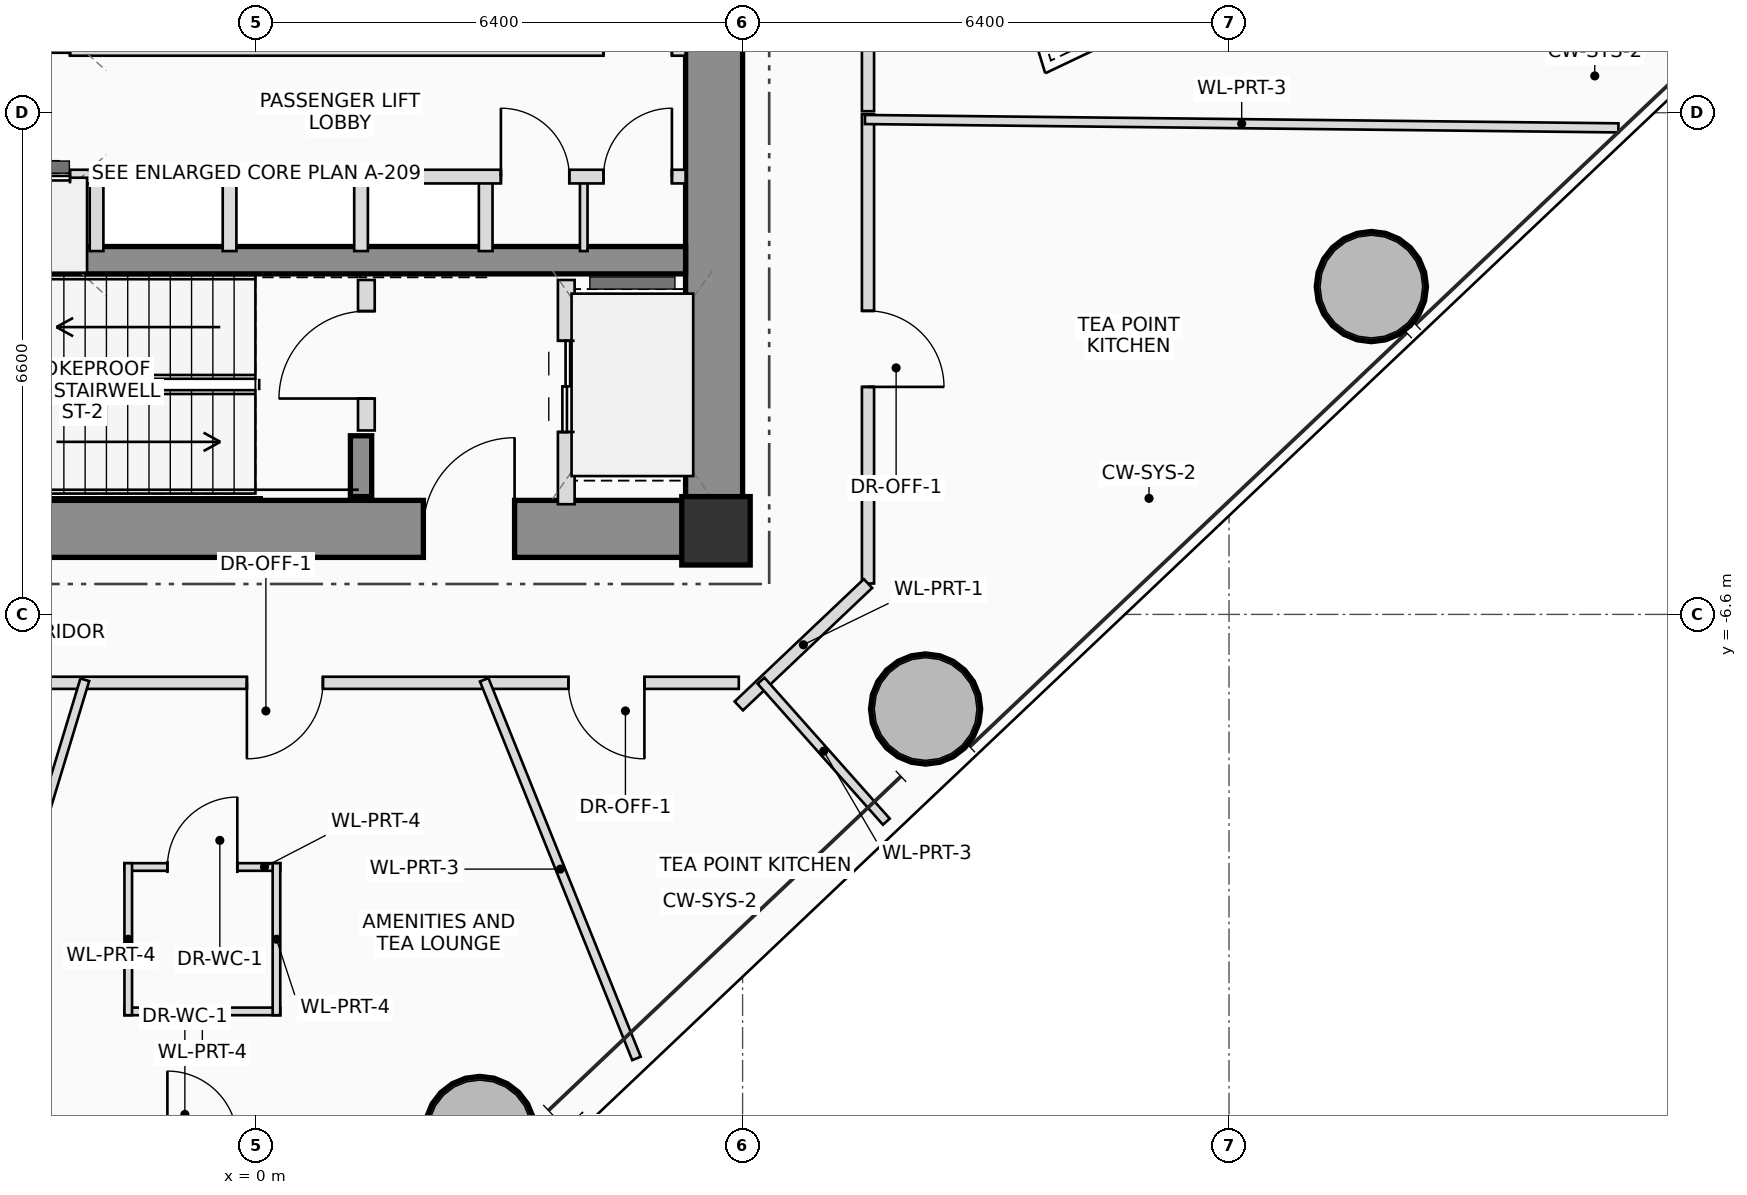
"""IFC4 building model, lengths in metres.
Left out: names, types, materials, properties, quantities, classifications, styles, units other than length and angle.
Written with IfcOpenShell. Run it as: python <this file> out.ifc"""

import sys

from ifc_helpers import new_model, si_unit, direction, frame, frame_2d, origin, origin_2d, place, context, subcontext, project, spatial, rectangle, hollow_circle, extrude, source, transform, mapped, element, fill, save


model = new_model("IFC4")
c1 = context("Model", 3, precision=1e-05, world=origin(), true_north=direction((0.0, 1.0)))
c2 = subcontext(c1, "Body", "Model", "MODEL_VIEW")
j1 = project(units=[si_unit("LENGTHUNIT", "METRE"), si_unit("PLANEANGLEUNIT", "RADIAN")], contexts=[c1])
p1 = place(None, origin())
s1 = spatial("IfcSite", under=j1, at=p1, CompositionType="ELEMENT")
p2 = place(p1, origin())
s2 = spatial("IfcBuilding", under=s1, at=p2, CompositionType="ELEMENT")
p3 = place(p2, frame((0.0, 0.0, 97.4)))
s3 = spatial("IfcBuildingStorey", under=s2, at=p3, CompositionType="ELEMENT", Elevation=97.4)
m1 = source(origin(), c2, "Body", "SweptSolid", [
    extrude(rectangle(XDim=0.9, YDim=0.9, at=origin_2d()), origin(), (0.0, 0.0, 1.0), 3.75),
])
p4 = place(p3, frame((6.05, -5.5, 0.0), z_axis=(0.0, 0.0, 1.0), x_axis=(1.0, 0.0, 0.0)))
e1 = element("IfcColumn", 1, at=p4, inside=s3, PredefinedType="COLUMN", context=c2, shape_type="MappedRepresentation", body=[
    mapped(m1, transform((0.0, 0.0, 0.0), scale=1.0)),
])
p5 = place(p3, frame((-6.4, -5.475, 0.0), z_axis=(0.0, 0.0, 1.0), x_axis=(1.0, 0.0, 0.0)))
e2 = element("IfcWall", 2, at=p5, inside=s3, PredefinedType="SHEAR", context=c2, shape_type="SweptSolid", body=[
    extrude(rectangle(XDim=12.8, YDim=0.75, at=frame_2d((6.4, 0.0))), origin(), (0.0, 0.0, 1.0), 3.75),
])
p6 = place(p5, frame((8.6, 0.0, 0.0)))
e3 = element("IfcOpeningElement", 3, at=p6, cuts=e2, PredefinedType="OPENING", context=c2, shape_type="SweptSolid", body=[
    extrude(rectangle(XDim=1.2, YDim=2.2, at=frame_2d((0.6, 1.1))), frame((0.0, 0.385, 0.0), z_axis=(0.0, -1.0, 0.0), x_axis=(1.0, 0.0, 0.0)), (0.0, 0.0, 1.0), 0.77),
])
p7 = place(p3, frame((6.025, -5.1, 0.0), z_axis=(0.0, 0.0, 1.0), x_axis=(0.0, 1.0, 0.0)))
e4 = element("IfcWall", 4, at=p7, inside=s3, PredefinedType="SHEAR", context=c2, shape_type="SweptSolid", body=[
    extrude(rectangle(XDim=10.2, YDim=0.75, at=frame_2d((5.1, 0.0))), origin(), (0.0, 0.0, 1.0), 3.75),
])
p8 = place(p3, frame((-5.65, -1.94, 0.0), z_axis=(0.0, 0.0, 1.0), x_axis=(1.0, 0.0, 0.0)))
e5 = element("IfcWall", 5, at=p8, inside=s3, PredefinedType="SHEAR", context=c2, shape_type="SweptSolid", body=[
    extrude(rectangle(XDim=11.3, YDim=0.36, at=frame_2d((5.65, 0.0))), origin(), (0.0, 0.0, 1.0), 3.75),
])
p9 = place(p3, frame((1.38, -5.05, 0.0), z_axis=(0.0, 0.0, 1.0), x_axis=(0.0, 1.0, 0.0)))
e6 = element("IfcWall", 6, at=p9, inside=s3, PredefinedType="SHEAR", context=c2, shape_type="SweptSolid", body=[
    extrude(rectangle(XDim=0.8, YDim=0.28, at=frame_2d((0.4, 0.0))), origin(), (0.0, 0.0, 1.0), 3.75),
])
m2 = source(origin(), c2, "Body", "SweptSolid", [
    extrude(hollow_circle(Radius=0.725, WallThickness=0.05, at=origin_2d()), origin(), (0.0, 0.0, 1.0), 3.75),
])
for number, where, z_axis, x_axis in (
    (7, (2.943, -13.402, 0.0), (0.0, 0.0, 1.0), (1.0, 0.0, 0.0)),
    (8, (8.808, -7.845, 0.0), (0.0, 0.0, 1.0), (1.0, 0.0, 0.0)),
    (9, (14.673, -2.287, 0.0), (0.0, 0.0, 1.0), (1.0, 0.0, 0.0)),
):
    element("IfcColumn", number, at=place(p3, frame(where, z_axis=z_axis, x_axis=x_axis)), inside=s3, PredefinedType="COLUMN", context=c2, shape_type="MappedRepresentation", body=[
        mapped(m2, transform((0.0, 0.0, 0.0), scale=1.0)),
    ])
p10 = place(p3, frame((1.45, -4.18, 0.0), z_axis=(0.0, 0.0, 1.0), x_axis=(0.0, 1.0, 0.0)))
e10 = element("IfcWall", 10, at=p10, inside=s3, PredefinedType="PLUMBINGWALL", context=c2, shape_type="SweptSolid", body=[
    extrude(rectangle(XDim=1.98, YDim=0.22, at=frame_2d((0.99, 0.0))), origin(), (0.0, 0.0, 1.0), 3.545),
])
p11 = place(p10, frame((0.42, 0.0, 0.0)))
e11 = element("IfcOpeningElement", 11, at=p11, cuts=e10, PredefinedType="OPENING", context=c2, shape_type="SweptSolid", body=[
    extrude(rectangle(XDim=1.15, YDim=2.15, at=frame_2d((0.575, 1.075))), frame((0.0, 0.12, 0.0), z_axis=(0.0, -1.0, 0.0), x_axis=(1.0, 0.0, 0.0)), (0.0, 0.0, 1.0), 0.24),
])
p12 = place(p3, frame((4.08, -5.15, 0.0), z_axis=(0.0, 0.0, 1.0), x_axis=(0.0, 1.0, 0.0)))
e12 = element("IfcWall", 12, at=p12, inside=s3, PredefinedType="PLUMBINGWALL", context=c2, shape_type="SweptSolid", body=[
    extrude(rectangle(XDim=2.95, YDim=0.22, at=frame_2d((1.475, 0.0))), origin(), (0.0, 0.0, 1.0), 3.545),
])
p13 = place(p12, frame((0.95, 0.0, 0.0)))
e13 = element("IfcOpeningElement", 13, at=p13, cuts=e12, PredefinedType="OPENING", context=c2, shape_type="SweptSolid", body=[
    extrude(rectangle(XDim=1.2, YDim=2.25, at=frame_2d((0.6, 1.125))), frame((0.0, 0.12, 0.0), z_axis=(0.0, -1.0, 0.0), x_axis=(1.0, 0.0, 0.0)), (0.0, 0.0, 1.0), 0.24),
])
for number, where, z_axis, x_axis in (
    (14, (-2.1, -1.82, 0.0), (0.0, 0.0, 1.0), (0.0, 1.0, 0.0)),
    (15, (-0.35, -1.82, 0.0), (0.0, 0.0, 1.0), (0.0, 1.0, 0.0)),
    (16, (1.38, -1.82, 0.0), (0.0, 0.0, 1.0), (0.0, 1.0, 0.0)),
    (17, (3.02, -1.82, 0.0), (0.0, 0.0, 1.0), (0.0, 1.0, 0.0)),
):
    element("IfcWall", number, at=place(p3, frame(where, z_axis=z_axis, x_axis=x_axis)), inside=s3, PredefinedType="PLUMBINGWALL", context=c2, shape_type="SweptSolid", body=[
        extrude(rectangle(XDim=0.98, YDim=0.18, at=frame_2d((0.49, 0.0))), origin(), (0.0, 0.0, 1.0), 3.545),
    ])
p14 = place(p3, frame((4.31, -1.82, 0.0), z_axis=(0.0, 0.0, 1.0), x_axis=(0.0, 1.0, 0.0)))
e18 = element("IfcWall", 18, at=p14, inside=s3, PredefinedType="PARTITIONING", context=c2, shape_type="SweptSolid", body=[
    extrude(rectangle(XDim=0.98, YDim=0.1, at=frame_2d((0.49, 0.0))), origin(), (0.0, 0.0, 1.0), 3.545),
])
p15 = place(p3, frame((-5.68, 0.84, 0.0), z_axis=(0.0, 0.0, 1.0), x_axis=(1.0, 0.0, 0.0)))
e19 = element("IfcWall", 19, at=p15, inside=s3, PredefinedType="PLUMBINGWALL", context=c2, shape_type="SweptSolid", body=[
    extrude(rectangle(XDim=11.33, YDim=0.18, at=frame_2d((5.665, 0.0))), origin(), (0.0, 0.0, 1.0), 3.545),
])
p16 = place(p15, frame((0.43, 0.0, 0.0)))
e20 = element("IfcOpeningElement", 20, at=p16, cuts=e19, PredefinedType="OPENING", context=c2, shape_type="SweptSolid", body=[
    extrude(rectangle(XDim=1.1, YDim=2.2, at=frame_2d((0.55, 1.1))), frame((0.0, 0.1, 0.0), z_axis=(0.0, -1.0, 0.0), x_axis=(1.0, 0.0, 0.0)), (0.0, 0.0, 1.0), 0.2),
])
p17 = place(p15, frame((2.13, 0.0, 0.0)))
e21 = element("IfcOpeningElement", 21, at=p17, cuts=e19, PredefinedType="OPENING", context=c2, shape_type="SweptSolid", body=[
    extrude(rectangle(XDim=1.1, YDim=2.2, at=frame_2d((0.55, 1.1))), frame((0.0, 0.1, 0.0), z_axis=(0.0, -1.0, 0.0), x_axis=(1.0, 0.0, 0.0)), (0.0, 0.0, 1.0), 0.2),
])
p18 = place(p15, frame((10.25, 0.0, 0.0)))
e22 = element("IfcOpeningElement", 22, at=p18, cuts=e19, PredefinedType="OPENING", context=c2, shape_type="SweptSolid", body=[
    extrude(rectangle(XDim=0.9, YDim=2.05, at=frame_2d((0.45, 1.025))), frame((0.0, 0.1, 0.0), z_axis=(0.0, -1.0, 0.0), x_axis=(1.0, 0.0, 0.0)), (0.0, 0.0, 1.0), 0.2),
])
p19 = place(p3, frame((-5.68, -0.84, 0.0), z_axis=(0.0, 0.0, 1.0), x_axis=(1.0, 0.0, 0.0)))
e23 = element("IfcWall", 23, at=p19, inside=s3, PredefinedType="PLUMBINGWALL", context=c2, shape_type="SweptSolid", body=[
    extrude(rectangle(XDim=11.33, YDim=0.18, at=frame_2d((5.665, 0.0))), origin(), (0.0, 0.0, 1.0), 3.545),
])
p20 = place(p19, frame((0.43, 0.0, 0.0)))
e24 = element("IfcOpeningElement", 24, at=p20, cuts=e23, PredefinedType="OPENING", context=c2, shape_type="SweptSolid", body=[
    extrude(rectangle(XDim=1.1, YDim=2.2, at=frame_2d((0.55, 1.1))), frame((0.0, 0.1, 0.0), z_axis=(0.0, -1.0, 0.0), x_axis=(1.0, 0.0, 0.0)), (0.0, 0.0, 1.0), 0.2),
])
p21 = place(p19, frame((2.13, 0.0, 0.0)))
e25 = element("IfcOpeningElement", 25, at=p21, cuts=e23, PredefinedType="OPENING", context=c2, shape_type="SweptSolid", body=[
    extrude(rectangle(XDim=1.1, YDim=2.2, at=frame_2d((0.55, 1.1))), frame((0.0, 0.1, 0.0), z_axis=(0.0, -1.0, 0.0), x_axis=(1.0, 0.0, 0.0)), (0.0, 0.0, 1.0), 0.2),
])
p22 = place(p19, frame((8.9, 0.0, 0.0)))
e26 = element("IfcOpeningElement", 26, at=p22, cuts=e23, PredefinedType="OPENING", context=c2, shape_type="SweptSolid", body=[
    extrude(rectangle(XDim=0.9, YDim=2.05, at=frame_2d((0.45, 1.025))), frame((0.0, 0.1, 0.0), z_axis=(0.0, -1.0, 0.0), x_axis=(1.0, 0.0, 0.0)), (0.0, 0.0, 1.0), 0.2),
])
p23 = place(p19, frame((10.25, 0.0, 0.0)))
e27 = element("IfcOpeningElement", 27, at=p23, cuts=e23, PredefinedType="OPENING", context=c2, shape_type="SweptSolid", body=[
    extrude(rectangle(XDim=0.9, YDim=2.05, at=frame_2d((0.45, 1.025))), frame((0.0, 0.1, 0.0), z_axis=(0.0, -1.0, 0.0), x_axis=(1.0, 0.0, 0.0)), (0.0, 0.0, 1.0), 0.2),
])
p24 = place(p3, frame((-1.733, -9.923, 0.0), z_axis=(0.0, 0.0, 1.0), x_axis=(1.0, 0.0, 0.0)))
e28 = element("IfcWall", 28, at=p24, inside=s3, PredefinedType="PARTITIONING", context=c2, shape_type="SweptSolid", body=[
    extrude(rectangle(XDim=2.05, YDim=0.1, at=frame_2d((1.025, 0.0))), origin(), (0.0, 0.0, 1.0), 3.545),
])
p25 = place(p24, frame((0.565, 0.0, 0.0)))
e29 = element("IfcOpeningElement", 29, at=p25, cuts=e28, PredefinedType="OPENING", context=c2, shape_type="SweptSolid", body=[
    extrude(rectangle(XDim=0.92, YDim=2.1, at=frame_2d((0.46, 1.05))), frame((0.0, 0.06, 0.0), z_axis=(0.0, -1.0, 0.0), x_axis=(1.0, 0.0, 0.0)), (0.0, 0.0, 1.0), 0.12),
])
p26 = place(p3, frame((0.317, -11.823, 0.0), z_axis=(0.0, 0.0, 1.0), x_axis=(-1.0, 0.0, 0.0)))
e30 = element("IfcWall", 30, at=p26, inside=s3, PredefinedType="PARTITIONING", context=c2, shape_type="SweptSolid", body=[
    extrude(rectangle(XDim=2.05, YDim=0.1, at=frame_2d((1.025, 0.0))), origin(), (0.0, 0.0, 1.0), 3.05),
])
for number, where, z_axis, x_axis in (
    (31, (0.267, -9.873, 0.0), (0.0, 0.0, 1.0), (0.0, -1.0, 0.0)),
    (32, (-1.683, -11.873, 0.0), (0.0, 0.0, 1.0), (0.0, 1.0, 0.0)),
):
    element("IfcWall", number, at=place(p3, frame(where, z_axis=z_axis, x_axis=x_axis)), inside=s3, PredefinedType="PARTITIONING", context=c2, shape_type="SweptSolid", body=[
        extrude(rectangle(XDim=2.0, YDim=0.1, at=frame_2d((1.0, 0.0))), origin(), (0.0, 0.0, 1.0), 3.05),
    ])
p27 = place(p3, frame((8.05, 7.5, 0.0), z_axis=(0.0, 0.0, 1.0), x_axis=(0.0, -1.0, 0.0)))
e33 = element("IfcWall", 33, at=p27, inside=s3, PredefinedType="PARTITIONING", context=c2, shape_type="SweptSolid", body=[
    extrude(rectangle(XDim=7.48, YDim=0.16, at=frame_2d((3.74, 0.0))), origin(), (0.0, 0.0, 1.0), 2.85),
])
p28 = place(p27, frame((5.491, 0.0, 0.0)))
e34 = element("IfcOpeningElement", 34, at=p28, cuts=e33, PredefinedType="OPENING", context=c2, shape_type="SweptSolid", body=[
    extrude(rectangle(XDim=1.0, YDim=2.25, at=frame_2d((0.5, 1.125))), frame((0.0, 0.09, 0.0), z_axis=(0.0, -1.0, 0.0), x_axis=(1.0, 0.0, 0.0)), (0.0, 0.0, 1.0), 0.18),
])
p29 = place(p3, frame((8.05, -0.02, 0.0), z_axis=(0.0, 0.0, 1.0), x_axis=(0.0, -1.0, 0.0)))
e35 = element("IfcWall", 35, at=p29, inside=s3, PredefinedType="PARTITIONING", context=c2, shape_type="SweptSolid", body=[
    extrude(rectangle(XDim=6.174, YDim=0.16, at=frame_2d((3.087, 0.0))), origin(), (0.0, 0.0, 1.0), 2.85),
])
p30 = place(p29, frame((2.587, 0.0, 0.0)))
e36 = element("IfcOpeningElement", 36, at=p30, cuts=e35, PredefinedType="OPENING", context=c2, shape_type="SweptSolid", body=[
    extrude(rectangle(XDim=1.0, YDim=2.25, at=frame_2d((0.5, 1.125))), frame((0.0, 0.09, 0.0), z_axis=(0.0, -1.0, 0.0), x_axis=(1.0, 0.0, 0.0)), (0.0, 0.0, 1.0), 0.18),
])
p31 = place(p3, frame((8.05, -6.194, 0.0), z_axis=(0.0, 0.0, 1.0), x_axis=(-0.725875977514, -0.687825606726, 0.0)))
e37 = element("IfcWall", 37, at=p31, inside=s3, PredefinedType="PARTITIONING", context=c2, shape_type="SweptSolid", body=[
    extrude(rectangle(XDim=2.342, YDim=0.16, at=frame_2d((1.171, 0.0))), origin(), (0.0, 0.0, 1.0), 2.85),
])
p32 = place(p3, frame((6.35, -7.5, 0.0), z_axis=(0.0, 0.0, 1.0), x_axis=(-1.0, 0.0, 0.0)))
e38 = element("IfcWall", 38, at=p32, inside=s3, PredefinedType="PARTITIONING", context=c2, shape_type="SweptSolid", body=[
    extrude(rectangle(XDim=12.7, YDim=0.16, at=frame_2d((6.35, 0.0))), origin(), (0.0, 0.0, 1.0), 2.85),
])
p33 = place(p32, frame((1.242, 0.0, 0.0)))
e39 = element("IfcOpeningElement", 39, at=p33, cuts=e38, PredefinedType="OPENING", context=c2, shape_type="SweptSolid", body=[
    extrude(rectangle(XDim=1.0, YDim=2.25, at=frame_2d((0.5, 1.125))), frame((0.0, 0.09, 0.0), z_axis=(0.0, -1.0, 0.0), x_axis=(1.0, 0.0, 0.0)), (0.0, 0.0, 1.0), 0.18),
])
p34 = place(p32, frame((5.472, 0.0, 0.0)))
e40 = element("IfcOpeningElement", 40, at=p34, cuts=e38, PredefinedType="OPENING", context=c2, shape_type="SweptSolid", body=[
    extrude(rectangle(XDim=1.0, YDim=2.25, at=frame_2d((0.5, 1.125))), frame((0.0, 0.09, 0.0), z_axis=(0.0, -1.0, 0.0), x_axis=(1.0, 0.0, 0.0)), (0.0, 0.0, 1.0), 0.18),
])
p35 = place(p3, frame((-2.255, -7.46, 0.0), z_axis=(0.0, 0.0, 1.0), x_axis=(-0.289332531311, -0.957228648926, 0.0)))
e41 = element("IfcWall", 41, at=p35, inside=s3, PredefinedType="PARTITIONING", context=c2, shape_type="SweptSolid", body=[
    extrude(rectangle(XDim=14.611, YDim=0.12, at=frame_2d((7.305, 0.0))), origin(), (0.0, 0.0, 1.0), 2.85),
])
p36 = place(p3, frame((3.0, -7.46, 0.0), z_axis=(0.0, 0.0, 1.0), x_axis=(0.37313810105, -0.927775812115, 0.0)))
e42 = element("IfcWall", 42, at=p36, inside=s3, PredefinedType="PARTITIONING", context=c2, shape_type="SweptSolid", body=[
    extrude(rectangle(XDim=5.37, YDim=0.12, at=frame_2d((2.685, 0.0))), origin(), (0.0, 0.0, 1.0), 2.85),
])
p37 = place(p3, frame((6.643, -7.472, 0.0), z_axis=(0.0, 0.0, 1.0), x_axis=(0.66436383883, -0.747409318684, 0.0)))
e43 = element("IfcWall", 43, at=p37, inside=s3, PredefinedType="PARTITIONING", context=c2, shape_type="SweptSolid", body=[
    extrude(rectangle(XDim=2.481, YDim=0.12, at=frame_2d((1.241, 0.0))), origin(), (0.0, 0.0, 1.0), 3.01),
])
p38 = place(p3, frame((8.01, -0.089, 0.0), z_axis=(0.0, 0.0, 1.0), x_axis=(0.999938319872, -0.011106594972, 0.0)))
e44 = element("IfcWall", 44, at=p38, inside=s3, PredefinedType="PARTITIONING", context=c2, shape_type="SweptSolid", body=[
    extrude(rectangle(XDim=9.914, YDim=0.12, at=frame_2d((4.957, 0.0))), origin(), (0.0, 0.0, 1.0), 2.85),
])
p39 = place(p6, origin())
e45 = element("IfcDoor", 45, at=p39, inside=s3, OperationType="SINGLE_SWING_RIGHT", PredefinedType="DOOR", context=c2, shape_type="SweptSolid", body=[
    extrude(rectangle(XDim=1.2, YDim=2.2, at=frame_2d((0.6, 1.1))), frame((0.0, 0.025, 0.0), z_axis=(0.0, -1.0, 0.0), x_axis=(1.0, 0.0, 0.0)), (0.0, 0.0, 1.0), 0.05),
])
fill(e3, e45)
p40 = place(p11, origin())
e46 = element("IfcDoor", 46, at=p40, inside=s3, OperationType="SINGLE_SWING_LEFT", PredefinedType="DOOR", context=c2, shape_type="SweptSolid", body=[
    extrude(rectangle(XDim=1.15, YDim=2.15, at=frame_2d((0.575, 1.075))), frame((0.0, 0.025, 0.0), z_axis=(0.0, -1.0, 0.0), x_axis=(1.0, 0.0, 0.0)), (0.0, 0.0, 1.0), 0.05),
])
fill(e11, e46)
p41 = place(p13, origin())
e47 = element("IfcDoor", 47, at=p41, inside=s3, OperationType="DOUBLE_DOOR_SLIDING", PredefinedType="DOOR", context=c2, shape_type="SweptSolid", body=[
    extrude(rectangle(XDim=1.2, YDim=2.25, at=frame_2d((0.6, 1.125))), frame((0.0, 0.025, 0.0), z_axis=(0.0, -1.0, 0.0), x_axis=(1.0, 0.0, 0.0)), (0.0, 0.0, 1.0), 0.05),
])
fill(e13, e47)
p42 = place(p21, origin())
e48 = element("IfcDoor", 48, at=p42, inside=s3, OperationType="DOUBLE_DOOR_SLIDING", PredefinedType="DOOR", context=c2, shape_type="SweptSolid", body=[
    extrude(rectangle(XDim=1.1, YDim=2.2, at=frame_2d((0.55, 1.1))), frame((0.0, 0.025, 0.0), z_axis=(0.0, -1.0, 0.0), x_axis=(1.0, 0.0, 0.0)), (0.0, 0.0, 1.0), 0.05),
])
fill(e25, e48)
p43 = place(p22, origin())
e49 = element("IfcDoor", 49, at=p43, inside=s3, OperationType="SINGLE_SWING_LEFT", PredefinedType="DOOR", context=c2, shape_type="SweptSolid", body=[
    extrude(rectangle(XDim=0.9, YDim=2.05, at=frame_2d((0.45, 1.025))), frame((0.0, 0.025, 0.0), z_axis=(0.0, -1.0, 0.0), x_axis=(1.0, 0.0, 0.0)), (0.0, 0.0, 1.0), 0.05),
])
fill(e26, e49)
p44 = place(p23, origin())
e50 = element("IfcDoor", 50, at=p44, inside=s3, OperationType="SINGLE_SWING_RIGHT", PredefinedType="DOOR", context=c2, shape_type="SweptSolid", body=[
    extrude(rectangle(XDim=0.9, YDim=2.05, at=frame_2d((0.45, 1.025))), frame((0.0, 0.025, 0.0), z_axis=(0.0, -1.0, 0.0), x_axis=(1.0, 0.0, 0.0)), (0.0, 0.0, 1.0), 0.05),
])
fill(e27, e50)
p45 = place(p25, origin())
e51 = element("IfcDoor", 51, at=p45, inside=s3, OperationType="SINGLE_SWING_RIGHT", PredefinedType="DOOR", context=c2, shape_type="SweptSolid", body=[
    extrude(rectangle(XDim=0.92, YDim=2.1, at=frame_2d((0.46, 1.05))), frame((0.0, 0.025, 0.0), z_axis=(0.0, -1.0, 0.0), x_axis=(1.0, 0.0, 0.0)), (0.0, 0.0, 1.0), 0.05),
])
fill(e29, e51)
p46 = place(p30, origin())
e52 = element("IfcDoor", 52, at=p46, inside=s3, OperationType="SINGLE_SWING_RIGHT", PredefinedType="DOOR", context=c2, shape_type="SweptSolid", body=[
    extrude(rectangle(XDim=1.0, YDim=2.25, at=frame_2d((0.5, 1.125))), frame((0.0, 0.025, 0.0), z_axis=(0.0, -1.0, 0.0), x_axis=(1.0, 0.0, 0.0)), (0.0, 0.0, 1.0), 0.05),
])
fill(e36, e52)
p47 = place(p33, origin())
e53 = element("IfcDoor", 53, at=p47, inside=s3, OperationType="SINGLE_SWING_LEFT", PredefinedType="DOOR", context=c2, shape_type="SweptSolid", body=[
    extrude(rectangle(XDim=1.0, YDim=2.25, at=frame_2d((0.5, 1.125))), frame((0.0, 0.025, 0.0), z_axis=(0.0, -1.0, 0.0), x_axis=(1.0, 0.0, 0.0)), (0.0, 0.0, 1.0), 0.05),
])
fill(e39, e53)
p48 = place(p34, origin())
e54 = element("IfcDoor", 54, at=p48, inside=s3, OperationType="SINGLE_SWING_RIGHT", PredefinedType="DOOR", context=c2, shape_type="SweptSolid", body=[
    extrude(rectangle(XDim=1.0, YDim=2.25, at=frame_2d((0.5, 1.125))), frame((0.0, 0.025, 0.0), z_axis=(0.0, -1.0, 0.0), x_axis=(1.0, 0.0, 0.0)), (0.0, 0.0, 1.0), 0.05),
])
fill(e40, e54)
save(model, sys.argv[1])
